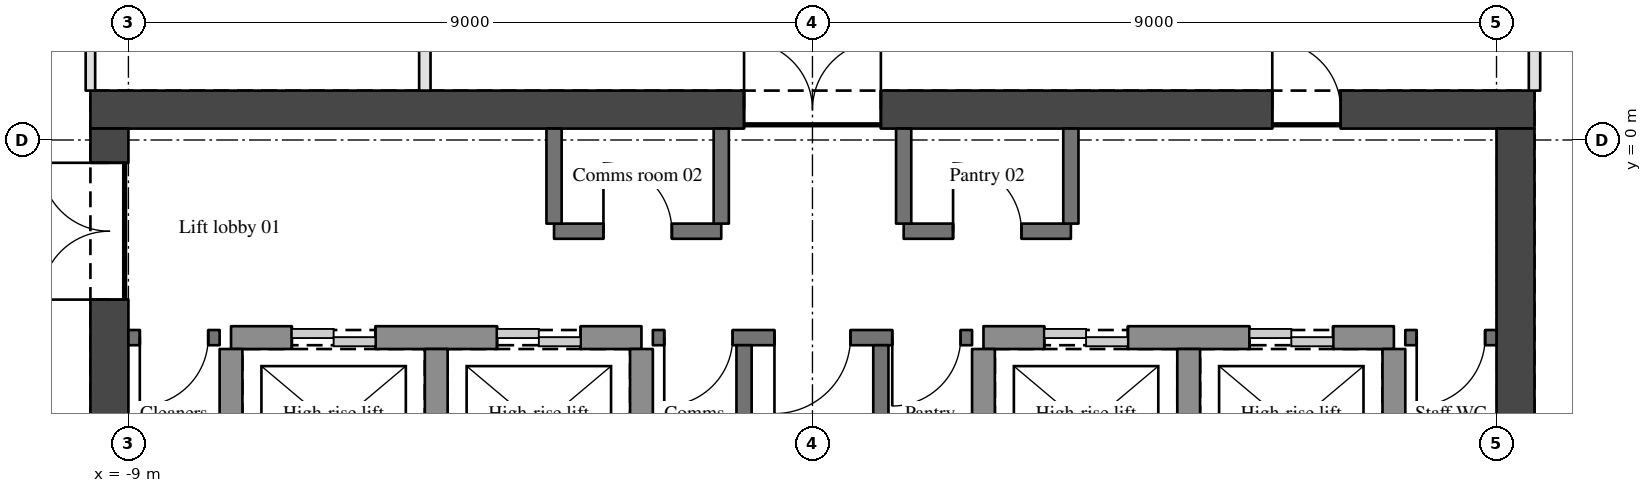
"""IFC4 building model, lengths in metres.
Left out: names, types, materials, properties, quantities, classifications, styles, units other than length and angle.
Written with IfcOpenShell. Run it as: python <this file> out.ifc"""

import sys

from ifc_helpers import new_model, si_unit, direction, frame, frame_2d, origin, place, context, subcontext, project, spatial, rectangle, extrude, element, fill, save


model = new_model("IFC4")
c1 = context("Model", 3, precision=1e-05, world=origin(), true_north=direction((0.0, 1.0)))
c2 = subcontext(c1, "Body", "Model", "MODEL_VIEW")
j1 = project(units=[si_unit("LENGTHUNIT", "METRE"), si_unit("PLANEANGLEUNIT", "RADIAN")], contexts=[c1])
p1 = place(None, origin())
s1 = spatial("IfcSite", under=j1, at=p1, CompositionType="ELEMENT")
p2 = place(p1, origin())
s2 = spatial("IfcBuilding", under=s1, at=p2, CompositionType="ELEMENT")
p3 = place(p2, frame((0.0, 0.0, 294.15)))
s3 = spatial("IfcBuildingStorey", under=s2, at=p3, CompositionType="ELEMENT", Elevation=294.15)
p4 = place(p3, frame((-9.5, 0.4, 0.0), z_axis=(0.0, 0.0, 1.0), x_axis=(1.0, 0.0, 0.0)))
e1 = element("IfcWall", 1, at=p4, inside=s3, PredefinedType="SHEAR", context=c2, shape_type="SweptSolid", body=[
    extrude(rectangle(XDim=19.0, YDim=0.5, at=frame_2d((9.5, 0.0))), origin(), (0.0, 0.0, 1.0), 3.15),
])
p5 = place(p4, frame((8.6, 0.0, 0.0)))
e2 = element("IfcOpeningElement", 2, at=p5, cuts=e1, PredefinedType="OPENING", context=c2, shape_type="SweptSolid", body=[
    extrude(rectangle(XDim=1.8, YDim=2.1, at=frame_2d((0.9, 1.05))), frame((0.0, 0.26, 0.0), z_axis=(0.0, -1.0, 0.0), x_axis=(1.0, 0.0, 0.0)), (0.0, 0.0, 1.0), 0.52),
])
p6 = place(p4, frame((15.55, 0.0, 0.0)))
e3 = element("IfcOpeningElement", 3, at=p6, cuts=e1, PredefinedType="OPENING", context=c2, shape_type="SweptSolid", body=[
    extrude(rectangle(XDim=0.9, YDim=2.1, at=frame_2d((0.45, 1.05))), frame((0.0, 0.26, 0.0), z_axis=(0.0, -1.0, 0.0), x_axis=(1.0, 0.0, 0.0)), (0.0, 0.0, 1.0), 0.52),
])
p7 = place(p3, frame((-9.25, -11.5, 0.0), z_axis=(0.0, 0.0, 1.0), x_axis=(0.0, 1.0, 0.0)))
e4 = element("IfcWall", 4, at=p7, inside=s3, PredefinedType="SHEAR", context=c2, shape_type="SweptSolid", body=[
    extrude(rectangle(XDim=11.65, YDim=0.5, at=frame_2d((5.825, 0.0))), origin(), (0.0, 0.0, 1.0), 3.15),
])
p8 = place(p7, frame((9.4, 0.0, 0.0)))
e5 = element("IfcOpeningElement", 5, at=p8, cuts=e4, PredefinedType="OPENING", context=c2, shape_type="SweptSolid", body=[
    extrude(rectangle(XDim=1.8, YDim=2.1, at=frame_2d((0.9, 1.05))), frame((0.0, 0.26, 0.0), z_axis=(0.0, -1.0, 0.0), x_axis=(1.0, 0.0, 0.0)), (0.0, 0.0, 1.0), 0.52),
])
p9 = place(p3, frame((9.25, -11.5, 0.0), z_axis=(0.0, 0.0, 1.0), x_axis=(0.0, 1.0, 0.0)))
e6 = element("IfcWall", 6, at=p9, inside=s3, PredefinedType="SHEAR", context=c2, shape_type="SweptSolid", body=[
    extrude(rectangle(XDim=11.65, YDim=0.5, at=frame_2d((5.825, 0.0))), origin(), (0.0, 0.0, 1.0), 3.15),
])
p10 = place(p3, frame((-7.8, -2.6, 0.0), z_axis=(0.0, 0.0, 1.0), x_axis=(-1.0, 0.0, 0.0)))
e7 = element("IfcWall", 7, at=p10, inside=s3, PredefinedType="SOLIDWALL", context=c2, shape_type="SweptSolid", body=[
    extrude(rectangle(XDim=1.2, YDim=0.2, at=frame_2d((0.6, 0.0))), origin(), (0.0, 0.0, 1.0), 2.85),
])
p11 = place(p10, frame((0.15, 0.0, 0.0)))
e8 = element("IfcOpeningElement", 8, at=p11, cuts=e7, PredefinedType="OPENING", context=c2, shape_type="SweptSolid", body=[
    extrude(rectangle(XDim=0.9, YDim=2.1, at=frame_2d((0.45, 1.05))), frame((0.0, 0.11, 0.0), z_axis=(0.0, -1.0, 0.0), x_axis=(1.0, 0.0, 0.0)), (0.0, 0.0, 1.0), 0.22),
])
p12 = place(p3, frame((-7.65, -2.6, 0.0), z_axis=(0.0, 0.0, 1.0), x_axis=(1.0, 0.0, 0.0)))
e9 = element("IfcWall", 9, at=p12, inside=s3, PredefinedType="SHEAR", context=c2, shape_type="SweptSolid", body=[
    extrude(rectangle(XDim=5.4, YDim=0.3, at=frame_2d((2.7, 0.0))), origin(), (0.0, 0.0, 1.0), 3.15),
])
p13 = place(p12, frame((0.8, 0.0, 0.0)))
e10 = element("IfcOpeningElement", 10, at=p13, cuts=e9, PredefinedType="OPENING", context=c2, shape_type="SweptSolid", body=[
    extrude(rectangle(XDim=1.1, YDim=2.1, at=frame_2d((0.55, 1.05))), frame((0.0, 0.16, 0.0), z_axis=(0.0, -1.0, 0.0), x_axis=(1.0, 0.0, 0.0)), (0.0, 0.0, 1.0), 0.32),
])
p14 = place(p12, frame((3.5, 0.0, 0.0)))
e11 = element("IfcOpeningElement", 11, at=p14, cuts=e9, PredefinedType="OPENING", context=c2, shape_type="SweptSolid", body=[
    extrude(rectangle(XDim=1.1, YDim=2.1, at=frame_2d((0.55, 1.05))), frame((0.0, 0.16, 0.0), z_axis=(0.0, -1.0, 0.0), x_axis=(1.0, 0.0, 0.0)), (0.0, 0.0, 1.0), 0.32),
])
p15 = place(p3, frame((2.1, -2.6, 0.0), z_axis=(0.0, 0.0, 1.0), x_axis=(-1.0, 0.0, 0.0)))
e12 = element("IfcWall", 12, at=p15, inside=s3, PredefinedType="SOLIDWALL", context=c2, shape_type="SweptSolid", body=[
    extrude(rectangle(XDim=4.2, YDim=0.2, at=frame_2d((2.1, 0.0))), origin(), (0.0, 0.0, 1.0), 2.85),
])
p16 = place(p15, frame((1.6, 0.0, 0.0)))
e13 = element("IfcOpeningElement", 13, at=p16, cuts=e12, PredefinedType="OPENING", context=c2, shape_type="SweptSolid", body=[
    extrude(rectangle(XDim=1.0, YDim=2.1, at=frame_2d((0.5, 1.05))), frame((0.0, 0.11, 0.0), z_axis=(0.0, -1.0, 0.0), x_axis=(1.0, 0.0, 0.0)), (0.0, 0.0, 1.0), 0.22),
])
p17 = place(p15, frame((3.15, 0.0, 0.0)))
e14 = element("IfcOpeningElement", 14, at=p17, cuts=e12, PredefinedType="OPENING", context=c2, shape_type="SweptSolid", body=[
    extrude(rectangle(XDim=0.9, YDim=2.1, at=frame_2d((0.45, 1.05))), frame((0.0, 0.11, 0.0), z_axis=(0.0, -1.0, 0.0), x_axis=(1.0, 0.0, 0.0)), (0.0, 0.0, 1.0), 0.22),
])
p18 = place(p15, frame((0.15, 0.0, 0.0)))
e15 = element("IfcOpeningElement", 15, at=p18, cuts=e12, PredefinedType="OPENING", context=c2, shape_type="SweptSolid", body=[
    extrude(rectangle(XDim=0.9, YDim=2.1, at=frame_2d((0.45, 1.05))), frame((0.0, 0.11, 0.0), z_axis=(0.0, -1.0, 0.0), x_axis=(1.0, 0.0, 0.0)), (0.0, 0.0, 1.0), 0.22),
])
p19 = place(p3, frame((2.25, -2.6, 0.0), z_axis=(0.0, 0.0, 1.0), x_axis=(1.0, 0.0, 0.0)))
e16 = element("IfcWall", 16, at=p19, inside=s3, PredefinedType="SHEAR", context=c2, shape_type="SweptSolid", body=[
    extrude(rectangle(XDim=5.4, YDim=0.3, at=frame_2d((2.7, 0.0))), origin(), (0.0, 0.0, 1.0), 3.15),
])
p20 = place(p19, frame((0.8, 0.0, 0.0)))
e17 = element("IfcOpeningElement", 17, at=p20, cuts=e16, PredefinedType="OPENING", context=c2, shape_type="SweptSolid", body=[
    extrude(rectangle(XDim=1.1, YDim=2.1, at=frame_2d((0.55, 1.05))), frame((0.0, 0.16, 0.0), z_axis=(0.0, -1.0, 0.0), x_axis=(1.0, 0.0, 0.0)), (0.0, 0.0, 1.0), 0.32),
])
p21 = place(p19, frame((3.5, 0.0, 0.0)))
e18 = element("IfcOpeningElement", 18, at=p21, cuts=e16, PredefinedType="OPENING", context=c2, shape_type="SweptSolid", body=[
    extrude(rectangle(XDim=1.1, YDim=2.1, at=frame_2d((0.55, 1.05))), frame((0.0, 0.16, 0.0), z_axis=(0.0, -1.0, 0.0), x_axis=(1.0, 0.0, 0.0)), (0.0, 0.0, 1.0), 0.32),
])
p22 = place(p3, frame((9.0, -2.6, 0.0), z_axis=(0.0, 0.0, 1.0), x_axis=(-1.0, 0.0, 0.0)))
e19 = element("IfcWall", 19, at=p22, inside=s3, PredefinedType="SOLIDWALL", context=c2, shape_type="SweptSolid", body=[
    extrude(rectangle(XDim=1.2, YDim=0.2, at=frame_2d((0.6, 0.0))), origin(), (0.0, 0.0, 1.0), 2.85),
])
p23 = place(p22, frame((0.15, 0.0, 0.0)))
e20 = element("IfcOpeningElement", 20, at=p23, cuts=e19, PredefinedType="OPENING", context=c2, shape_type="SweptSolid", body=[
    extrude(rectangle(XDim=0.9, YDim=2.1, at=frame_2d((0.45, 1.05))), frame((0.0, 0.11, 0.0), z_axis=(0.0, -1.0, 0.0), x_axis=(1.0, 0.0, 0.0)), (0.0, 0.0, 1.0), 0.22),
])
p24 = place(p3, frame((-3.4, -1.2, 0.0), z_axis=(0.0, 0.0, 1.0), x_axis=(1.0, 0.0, 0.0)))
e21 = element("IfcWall", 21, at=p24, inside=s3, PredefinedType="SOLIDWALL", context=c2, shape_type="SweptSolid", body=[
    extrude(rectangle(XDim=2.2, YDim=0.2, at=frame_2d((1.1, 0.0))), origin(), (0.0, 0.0, 1.0), 2.85),
])
p25 = place(p24, frame((0.65, 0.0, 0.0)))
e22 = element("IfcOpeningElement", 22, at=p25, cuts=e21, PredefinedType="OPENING", context=c2, shape_type="SweptSolid", body=[
    extrude(rectangle(XDim=0.9, YDim=2.1, at=frame_2d((0.45, 1.05))), frame((0.0, 0.11, 0.0), z_axis=(0.0, -1.0, 0.0), x_axis=(1.0, 0.0, 0.0)), (0.0, 0.0, 1.0), 0.22),
])
p26 = place(p3, frame((1.2, -1.2, 0.0), z_axis=(0.0, 0.0, 1.0), x_axis=(1.0, 0.0, 0.0)))
e23 = element("IfcWall", 23, at=p26, inside=s3, PredefinedType="SOLIDWALL", context=c2, shape_type="SweptSolid", body=[
    extrude(rectangle(XDim=2.2, YDim=0.2, at=frame_2d((1.1, 0.0))), origin(), (0.0, 0.0, 1.0), 2.85),
])
p27 = place(p26, frame((0.65, 0.0, 0.0)))
e24 = element("IfcOpeningElement", 24, at=p27, cuts=e23, PredefinedType="OPENING", context=c2, shape_type="SweptSolid", body=[
    extrude(rectangle(XDim=0.9, YDim=2.1, at=frame_2d((0.45, 1.05))), frame((0.0, 0.11, 0.0), z_axis=(0.0, -1.0, 0.0), x_axis=(1.0, 0.0, 0.0)), (0.0, 0.0, 1.0), 0.22),
])
p28 = place(p3, frame((-9.5, 0.65, 0.0), z_axis=(0.0, 0.0, 1.0), x_axis=(0.0, 1.0, 0.0)))
e25 = element("IfcWall", 25, at=p28, inside=s3, PredefinedType="PARTITIONING", context=c2, shape_type="SweptSolid", body=[
    extrude(rectangle(XDim=2.525, YDim=0.125, at=frame_2d((1.263, 0.0))), origin(), (0.0, 0.0, 1.0), 2.21),
])
p29 = place(p3, frame((-7.65, -4.8, 0.0), z_axis=(0.0, 0.0, 1.0), x_axis=(0.0, 1.0, 0.0)))
e26 = element("IfcWall", 26, at=p29, inside=s3, PredefinedType="SHEAR", context=c2, shape_type="SweptSolid", body=[
    extrude(rectangle(XDim=2.05, YDim=0.3, at=frame_2d((1.025, 0.0))), origin(), (0.0, 0.0, 1.0), 3.15),
])
p30 = place(p3, frame((-5.1, 0.65, 0.0), z_axis=(0.0, 0.0, 1.0), x_axis=(0.0, 1.0, 0.0)))
e27 = element("IfcWall", 27, at=p30, inside=s3, PredefinedType="PARTITIONING", context=c2, shape_type="SweptSolid", body=[
    extrude(rectangle(XDim=2.525, YDim=0.15, at=frame_2d((1.263, 0.0))), origin(), (0.0, 0.0, 1.0), 2.21),
])
p31 = place(p30, frame((0.85, 0.0, 0.0)))
e28 = element("IfcOpeningElement", 28, at=p31, cuts=e27, PredefinedType="OPENING", context=c2, shape_type="SweptSolid", body=[
    extrude(rectangle(XDim=0.9, YDim=2.1, at=frame_2d((0.45, 1.05))), frame((0.0, 0.085, 0.0), z_axis=(0.0, -1.0, 0.0), x_axis=(1.0, 0.0, 0.0)), (0.0, 0.0, 1.0), 0.17),
])
p32 = place(p3, frame((-4.95, -4.8, 0.0), z_axis=(0.0, 0.0, 1.0), x_axis=(0.0, 1.0, 0.0)))
e29 = element("IfcWall", 29, at=p32, inside=s3, PredefinedType="SHEAR", context=c2, shape_type="SweptSolid", body=[
    extrude(rectangle(XDim=2.05, YDim=0.3, at=frame_2d((1.025, 0.0))), origin(), (0.0, 0.0, 1.0), 3.15),
])
p33 = place(p3, frame((-3.4, -1.1, 0.0), z_axis=(0.0, 0.0, 1.0), x_axis=(0.0, 1.0, 0.0)))
e30 = element("IfcWall", 30, at=p33, inside=s3, PredefinedType="SOLIDWALL", context=c2, shape_type="SweptSolid", body=[
    extrude(rectangle(XDim=1.25, YDim=0.2, at=frame_2d((0.625, 0.0))), origin(), (0.0, 0.0, 1.0), 2.85),
])
p34 = place(p3, frame((-2.25, -4.8, 0.0), z_axis=(0.0, 0.0, 1.0), x_axis=(0.0, 1.0, 0.0)))
e31 = element("IfcWall", 31, at=p34, inside=s3, PredefinedType="SHEAR", context=c2, shape_type="SweptSolid", body=[
    extrude(rectangle(XDim=2.05, YDim=0.3, at=frame_2d((1.025, 0.0))), origin(), (0.0, 0.0, 1.0), 3.15),
])
p35 = place(p3, frame((-1.2, -1.1, 0.0), z_axis=(0.0, 0.0, 1.0), x_axis=(0.0, 1.0, 0.0)))
e32 = element("IfcWall", 32, at=p35, inside=s3, PredefinedType="SOLIDWALL", context=c2, shape_type="SweptSolid", body=[
    extrude(rectangle(XDim=1.25, YDim=0.2, at=frame_2d((0.625, 0.0))), origin(), (0.0, 0.0, 1.0), 2.85),
])
for number, where, z_axis, x_axis in (
    (33, (-0.9, -4.85, 0.0), (0.0, 0.0, 1.0), (0.0, 1.0, 0.0)),
    (34, (0.9, -4.85, 0.0), (0.0, 0.0, 1.0), (0.0, 1.0, 0.0)),
):
    element("IfcWall", number, at=place(p3, frame(where, z_axis=z_axis, x_axis=x_axis)), inside=s3, PredefinedType="SOLIDWALL", context=c2, shape_type="SweptSolid", body=[
        extrude(rectangle(XDim=2.15, YDim=0.2, at=frame_2d((1.075, 0.0))), origin(), (0.0, 0.0, 1.0), 2.85),
    ])
p36 = place(p3, frame((1.2, -1.1, 0.0), z_axis=(0.0, 0.0, 1.0), x_axis=(0.0, 1.0, 0.0)))
e35 = element("IfcWall", 35, at=p36, inside=s3, PredefinedType="SOLIDWALL", context=c2, shape_type="SweptSolid", body=[
    extrude(rectangle(XDim=1.25, YDim=0.2, at=frame_2d((0.625, 0.0))), origin(), (0.0, 0.0, 1.0), 2.85),
])
p37 = place(p3, frame((2.25, -4.8, 0.0), z_axis=(0.0, 0.0, 1.0), x_axis=(0.0, 1.0, 0.0)))
e36 = element("IfcWall", 36, at=p37, inside=s3, PredefinedType="SHEAR", context=c2, shape_type="SweptSolid", body=[
    extrude(rectangle(XDim=2.05, YDim=0.3, at=frame_2d((1.025, 0.0))), origin(), (0.0, 0.0, 1.0), 3.15),
])
p38 = place(p3, frame((3.4, -1.1, 0.0), z_axis=(0.0, 0.0, 1.0), x_axis=(0.0, 1.0, 0.0)))
e37 = element("IfcWall", 37, at=p38, inside=s3, PredefinedType="SOLIDWALL", context=c2, shape_type="SweptSolid", body=[
    extrude(rectangle(XDim=1.25, YDim=0.2, at=frame_2d((0.625, 0.0))), origin(), (0.0, 0.0, 1.0), 2.85),
])
for number, where, z_axis, x_axis in (
    (38, (4.95, -4.8, 0.0), (0.0, 0.0, 1.0), (0.0, 1.0, 0.0)),
    (39, (7.65, -4.8, 0.0), (0.0, 0.0, 1.0), (0.0, 1.0, 0.0)),
):
    element("IfcWall", number, at=place(p3, frame(where, z_axis=z_axis, x_axis=x_axis)), inside=s3, PredefinedType="SHEAR", context=c2, shape_type="SweptSolid", body=[
        extrude(rectangle(XDim=2.05, YDim=0.3, at=frame_2d((1.025, 0.0))), origin(), (0.0, 0.0, 1.0), 3.15),
    ])
p39 = place(p3, frame((9.5, 8.2, 0.0), z_axis=(0.0, 0.0, 1.0), x_axis=(0.0, -1.0, 0.0)))
e40 = element("IfcWall", 40, at=p39, inside=s3, PredefinedType="PARTITIONING", context=c2, shape_type="SweptSolid", body=[
    extrude(rectangle(XDim=7.55, YDim=0.15, at=frame_2d((3.775, 0.0))), origin(), (0.0, 0.0, 1.0), 2.21),
])
p40 = place(p39, frame((4.675, 0.0, 0.0)))
e41 = element("IfcOpeningElement", 41, at=p40, cuts=e40, PredefinedType="OPENING", context=c2, shape_type="SweptSolid", body=[
    extrude(rectangle(XDim=1.0, YDim=2.1, at=frame_2d((0.5, 1.05))), frame((0.0, 0.085, 0.0), z_axis=(0.0, -1.0, 0.0), x_axis=(1.0, 0.0, 0.0)), (0.0, 0.0, 1.0), 0.17),
])
p41 = place(p5, origin())
e42 = element("IfcDoor", 42, at=p41, inside=s3, OperationType="DOUBLE_DOOR_SINGLE_SWING", PredefinedType="DOOR", context=c2, shape_type="SweptSolid", body=[
    extrude(rectangle(XDim=1.8, YDim=2.1, at=frame_2d((0.9, 1.05))), frame((0.0, 0.025, 0.0), z_axis=(0.0, -1.0, 0.0), x_axis=(1.0, 0.0, 0.0)), (0.0, 0.0, 1.0), 0.05),
])
fill(e2, e42)
p42 = place(p8, origin())
e43 = element("IfcDoor", 43, at=p42, inside=s3, OperationType="DOUBLE_DOOR_SINGLE_SWING", PredefinedType="DOOR", context=c2, shape_type="SweptSolid", body=[
    extrude(rectangle(XDim=1.8, YDim=2.1, at=frame_2d((0.9, 1.05))), frame((0.0, 0.025, 0.0), z_axis=(0.0, -1.0, 0.0), x_axis=(1.0, 0.0, 0.0)), (0.0, 0.0, 1.0), 0.05),
])
fill(e5, e43)
p43 = place(p16, origin())
e44 = element("IfcDoor", 44, at=p43, inside=s3, OperationType="SINGLE_SWING_RIGHT", PredefinedType="DOOR", context=c2, shape_type="SweptSolid", body=[
    extrude(rectangle(XDim=1.0, YDim=2.1, at=frame_2d((0.5, 1.05))), frame((0.0, 0.025, 0.0), z_axis=(0.0, -1.0, 0.0), x_axis=(1.0, 0.0, 0.0)), (0.0, 0.0, 1.0), 0.05),
])
fill(e13, e44)
p44 = place(p17, origin())
e45 = element("IfcDoor", 45, at=p44, inside=s3, OperationType="SINGLE_SWING_RIGHT", PredefinedType="DOOR", context=c2, shape_type="SweptSolid", body=[
    extrude(rectangle(XDim=0.9, YDim=2.1, at=frame_2d((0.45, 1.05))), frame((0.0, 0.025, 0.0), z_axis=(0.0, -1.0, 0.0), x_axis=(1.0, 0.0, 0.0)), (0.0, 0.0, 1.0), 0.05),
])
fill(e14, e45)
p45 = place(p18, origin())
e46 = element("IfcDoor", 46, at=p45, inside=s3, OperationType="SINGLE_SWING_RIGHT", PredefinedType="DOOR", context=c2, shape_type="SweptSolid", body=[
    extrude(rectangle(XDim=0.9, YDim=2.1, at=frame_2d((0.45, 1.05))), frame((0.0, 0.025, 0.0), z_axis=(0.0, -1.0, 0.0), x_axis=(1.0, 0.0, 0.0)), (0.0, 0.0, 1.0), 0.05),
])
fill(e15, e46)
p46 = place(p23, origin())
e47 = element("IfcDoor", 47, at=p46, inside=s3, OperationType="SINGLE_SWING_RIGHT", PredefinedType="DOOR", context=c2, shape_type="SweptSolid", body=[
    extrude(rectangle(XDim=0.9, YDim=2.1, at=frame_2d((0.45, 1.05))), frame((0.0, 0.025, 0.0), z_axis=(0.0, -1.0, 0.0), x_axis=(1.0, 0.0, 0.0)), (0.0, 0.0, 1.0), 0.05),
])
fill(e20, e47)
p47 = place(p11, origin())
e48 = element("IfcDoor", 48, at=p47, inside=s3, OperationType="SINGLE_SWING_RIGHT", PredefinedType="DOOR", context=c2, shape_type="SweptSolid", body=[
    extrude(rectangle(XDim=0.9, YDim=2.1, at=frame_2d((0.45, 1.05))), frame((0.0, 0.025, 0.0), z_axis=(0.0, -1.0, 0.0), x_axis=(1.0, 0.0, 0.0)), (0.0, 0.0, 1.0), 0.05),
])
fill(e8, e48)
p48 = place(p6, origin())
e49 = element("IfcDoor", 49, at=p48, inside=s3, OperationType="SINGLE_SWING_LEFT", PredefinedType="DOOR", context=c2, shape_type="SweptSolid", body=[
    extrude(rectangle(XDim=0.9, YDim=2.1, at=frame_2d((0.45, 1.05))), frame((0.0, 0.025, 0.0), z_axis=(0.0, -1.0, 0.0), x_axis=(1.0, 0.0, 0.0)), (0.0, 0.0, 1.0), 0.05),
])
fill(e3, e49)
p49 = place(p25, origin())
e50 = element("IfcDoor", 50, at=p49, inside=s3, OperationType="SINGLE_SWING_LEFT", PredefinedType="DOOR", context=c2, shape_type="SweptSolid", body=[
    extrude(rectangle(XDim=0.9, YDim=2.1, at=frame_2d((0.45, 1.05))), frame((0.0, 0.025, 0.0), z_axis=(0.0, -1.0, 0.0), x_axis=(1.0, 0.0, 0.0)), (0.0, 0.0, 1.0), 0.05),
])
fill(e22, e50)
p50 = place(p27, origin())
e51 = element("IfcDoor", 51, at=p50, inside=s3, OperationType="SINGLE_SWING_LEFT", PredefinedType="DOOR", context=c2, shape_type="SweptSolid", body=[
    extrude(rectangle(XDim=0.9, YDim=2.1, at=frame_2d((0.45, 1.05))), frame((0.0, 0.025, 0.0), z_axis=(0.0, -1.0, 0.0), x_axis=(1.0, 0.0, 0.0)), (0.0, 0.0, 1.0), 0.05),
])
fill(e24, e51)
p51 = place(p13, origin())
e52 = element("IfcDoor", 52, at=p51, inside=s3, OperationType="DOUBLE_DOOR_SLIDING", PredefinedType="DOOR", context=c2, shape_type="SweptSolid", body=[
    extrude(rectangle(XDim=1.1, YDim=2.1, at=frame_2d((0.55, 1.05))), frame((0.0, 0.025, 0.0), z_axis=(0.0, -1.0, 0.0), x_axis=(1.0, 0.0, 0.0)), (0.0, 0.0, 1.0), 0.05),
])
fill(e10, e52)
p52 = place(p14, origin())
e53 = element("IfcDoor", 53, at=p52, inside=s3, OperationType="DOUBLE_DOOR_SLIDING", PredefinedType="DOOR", context=c2, shape_type="SweptSolid", body=[
    extrude(rectangle(XDim=1.1, YDim=2.1, at=frame_2d((0.55, 1.05))), frame((0.0, 0.025, 0.0), z_axis=(0.0, -1.0, 0.0), x_axis=(1.0, 0.0, 0.0)), (0.0, 0.0, 1.0), 0.05),
])
fill(e11, e53)
p53 = place(p20, origin())
e54 = element("IfcDoor", 54, at=p53, inside=s3, OperationType="DOUBLE_DOOR_SLIDING", PredefinedType="DOOR", context=c2, shape_type="SweptSolid", body=[
    extrude(rectangle(XDim=1.1, YDim=2.1, at=frame_2d((0.55, 1.05))), frame((0.0, 0.025, 0.0), z_axis=(0.0, -1.0, 0.0), x_axis=(1.0, 0.0, 0.0)), (0.0, 0.0, 1.0), 0.05),
])
fill(e17, e54)
p54 = place(p21, origin())
e55 = element("IfcDoor", 55, at=p54, inside=s3, OperationType="DOUBLE_DOOR_SLIDING", PredefinedType="DOOR", context=c2, shape_type="SweptSolid", body=[
    extrude(rectangle(XDim=1.1, YDim=2.1, at=frame_2d((0.55, 1.05))), frame((0.0, 0.025, 0.0), z_axis=(0.0, -1.0, 0.0), x_axis=(1.0, 0.0, 0.0)), (0.0, 0.0, 1.0), 0.05),
])
fill(e18, e55)
save(model, sys.argv[1])
